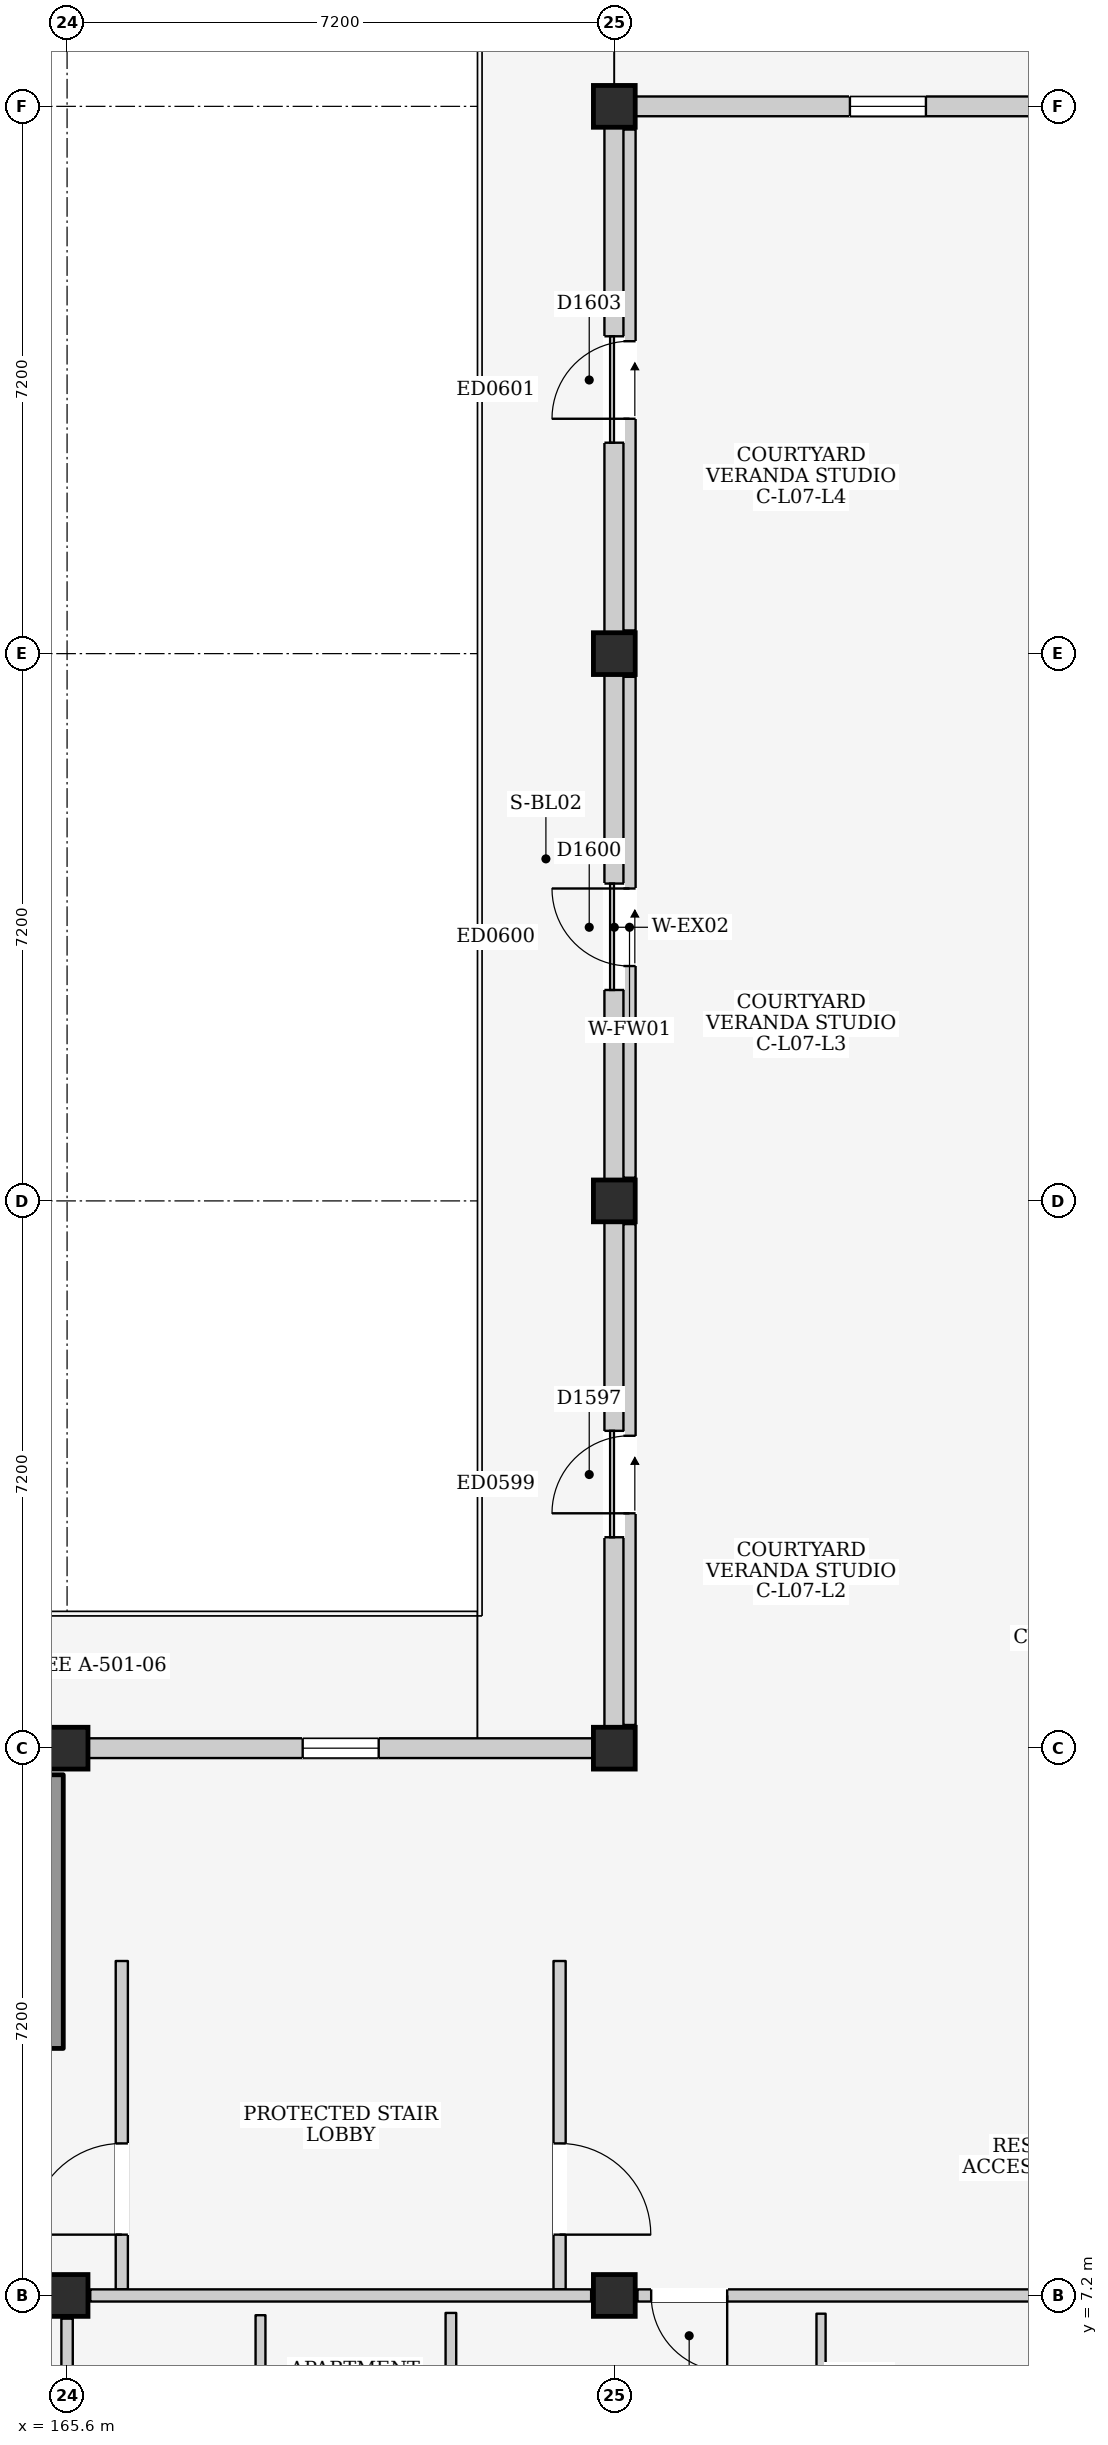
"""IFC4 building model, lengths in metres.
Left out: names, types, materials, properties, quantities, classifications, styles, units other than length and angle.
Written with IfcOpenShell. Run it as: python <this file> out.ifc"""

import sys

from ifc_helpers import new_model, si_unit, direction, frame, frame_2d, origin, origin_2d, place, context, subcontext, project, spatial, rectangle, extrude, element, fill, save


model = new_model("IFC4")
c1 = context("Model", 3, precision=1e-05, world=origin(), true_north=direction((0.0, 1.0)))
c2 = subcontext(c1, "Body", "Model", "MODEL_VIEW")
j1 = project(units=[si_unit("LENGTHUNIT", "METRE"), si_unit("PLANEANGLEUNIT", "RADIAN")], contexts=[c1])
p1 = place(None, origin())
s1 = spatial("IfcSite", under=j1, at=p1, CompositionType="ELEMENT")
p2 = place(p1, origin())
s2 = spatial("IfcBuilding", under=s1, at=p2, CompositionType="ELEMENT")
p3 = place(p2, frame((0.0, 0.0, 25.1)))
s3 = spatial("IfcBuildingStorey", under=s2, at=p3, CompositionType="ELEMENT", Elevation=25.1)
for number, where, z_axis, x_axis in (
    (1, (165.6, 7.2, 0.0), (0.0, 0.0, 1.0), (1.0, 0.0, 0.0)),
    (2, (165.6, 14.4, 0.0), (0.0, 0.0, 1.0), (1.0, 0.0, 0.0)),
    (3, (172.8, 7.2, 0.0), (0.0, 0.0, 1.0), (1.0, 0.0, 0.0)),
    (4, (172.8, 14.4, 0.0), (0.0, 0.0, 1.0), (1.0, 0.0, 0.0)),
    (5, (172.8, 21.6, 0.0), (0.0, 0.0, 1.0), (1.0, 0.0, 0.0)),
    (6, (172.8, 28.8, 0.0), (0.0, 0.0, 1.0), (1.0, 0.0, 0.0)),
    (7, (172.8, 36.0, 0.0), (0.0, 0.0, 1.0), (1.0, 0.0, 0.0)),
):
    element("IfcColumn", number, at=place(p3, frame(where, z_axis=z_axis, x_axis=x_axis)), inside=s3, PredefinedType="COLUMN", context=c2, shape_type="SweptSolid", body=[
        extrude(rectangle(XDim=0.55, YDim=0.55, at=origin_2d()), origin(), (0.0, 0.0, 1.0), 3.2),
    ])
p4 = place(p3, frame((165.875, 14.4, 0.0), z_axis=(0.0, 0.0, 1.0), x_axis=(1.0, 0.0, 0.0)))
e8 = element("IfcWall", 8, at=p4, inside=s3, PredefinedType="ELEMENTEDWALL", context=c2, shape_type="SweptSolid", body=[
    extrude(rectangle(XDim=6.65, YDim=0.26, at=frame_2d((3.325, 0.0))), origin(), (0.0, 0.0, 1.0), 2.375),
])
p5 = place(p4, frame((2.825, 0.0, 1.2)))
e9 = element("IfcOpeningElement", 9, at=p5, cuts=e8, PredefinedType="OPENING", context=c2, shape_type="SweptSolid", body=[
    extrude(rectangle(XDim=1.0, YDim=0.9, at=frame_2d((0.5, 0.45))), frame((0.0, 0.145, 0.0), z_axis=(0.0, -1.0, 0.0), x_axis=(1.0, 0.0, 0.0)), (0.0, 0.0, 1.0), 0.29),
])
p6 = place(p3, frame((172.8, 14.675, 0.0), z_axis=(0.0, 0.0, 1.0), x_axis=(0.0, 1.0, 0.0)))
e10 = element("IfcWall", 10, at=p6, inside=s3, PredefinedType="ELEMENTEDWALL", context=c2, shape_type="SweptSolid", body=[
    extrude(rectangle(XDim=6.65, YDim=0.26, at=frame_2d((3.325, 0.0))), origin(), (0.0, 0.0, 1.0), 2.475),
])
p7 = place(p6, frame((2.5, 0.0, 0.0)))
e11 = element("IfcOpeningElement", 11, at=p7, cuts=e10, PredefinedType="OPENING", context=c2, shape_type="SweptSolid", body=[
    extrude(rectangle(XDim=1.4, YDim=2.1, at=frame_2d((0.7, 1.05))), frame((0.0, 0.145, 0.0), z_axis=(0.0, -1.0, 0.0), x_axis=(1.0, 0.0, 0.0)), (0.0, 0.0, 1.0), 0.29),
])
p8 = place(p3, frame((172.8, 21.875, 0.0), z_axis=(0.0, 0.0, 1.0), x_axis=(0.0, 1.0, 0.0)))
e12 = element("IfcWall", 12, at=p8, inside=s3, PredefinedType="ELEMENTEDWALL", context=c2, shape_type="SweptSolid", body=[
    extrude(rectangle(XDim=6.65, YDim=0.26, at=frame_2d((3.325, 0.0))), origin(), (0.0, 0.0, 1.0), 2.475),
])
p9 = place(p8, frame((2.5, 0.0, 0.0)))
e13 = element("IfcOpeningElement", 13, at=p9, cuts=e12, PredefinedType="OPENING", context=c2, shape_type="SweptSolid", body=[
    extrude(rectangle(XDim=1.4, YDim=2.1, at=frame_2d((0.7, 1.05))), frame((0.0, 0.145, 0.0), z_axis=(0.0, -1.0, 0.0), x_axis=(1.0, 0.0, 0.0)), (0.0, 0.0, 1.0), 0.29),
])
p10 = place(p3, frame((173.075, 36.0, 0.0), z_axis=(0.0, 0.0, 1.0), x_axis=(1.0, 0.0, 0.0)))
e14 = element("IfcWall", 14, at=p10, inside=s3, PredefinedType="ELEMENTEDWALL", context=c2, shape_type="SweptSolid", body=[
    extrude(rectangle(XDim=6.65, YDim=0.26, at=frame_2d((3.325, 0.0))), origin(), (0.0, 0.0, 1.0), 2.375),
])
p11 = place(p10, frame((2.825, 0.0, 1.1)))
e15 = element("IfcOpeningElement", 15, at=p11, cuts=e14, PredefinedType="OPENING", context=c2, shape_type="SweptSolid", body=[
    extrude(rectangle(XDim=1.0, YDim=0.9, at=frame_2d((0.5, 0.45))), frame((0.0, 0.145, 0.0), z_axis=(0.0, -1.0, 0.0), x_axis=(1.0, 0.0, 0.0)), (0.0, 0.0, 1.0), 0.29),
])
p12 = place(p3, frame((172.8, 29.075, 0.0), z_axis=(0.0, 0.0, 1.0), x_axis=(0.0, 1.0, 0.0)))
e16 = element("IfcWall", 16, at=p12, inside=s3, PredefinedType="ELEMENTEDWALL", context=c2, shape_type="SweptSolid", body=[
    extrude(rectangle(XDim=6.65, YDim=0.26, at=frame_2d((3.325, 0.0))), origin(), (0.0, 0.0, 1.0), 2.475),
])
p13 = place(p12, frame((2.5, 0.0, 0.0)))
e17 = element("IfcOpeningElement", 17, at=p13, cuts=e16, PredefinedType="OPENING", context=c2, shape_type="SweptSolid", body=[
    extrude(rectangle(XDim=1.4, YDim=2.1, at=frame_2d((0.7, 1.05))), frame((0.0, 0.145, 0.0), z_axis=(0.0, -1.0, 0.0), x_axis=(1.0, 0.0, 0.0)), (0.0, 0.0, 1.0), 0.29),
])
p14 = place(p3, frame((165.4, 10.45, 0.0), z_axis=(0.0, 0.0, 1.0), x_axis=(0.0, 1.0, 0.0)))
e18 = element("IfcWall", 18, at=p14, inside=s3, PredefinedType="SHEAR", context=c2, shape_type="SweptSolid", body=[
    extrude(rectangle(XDim=3.6, YDim=0.3, at=frame_2d((1.8, 0.0))), origin(), (0.0, 0.0, 1.0), 2.99),
])
p15 = place(p3, frame((166.32, 7.28, 0.0), z_axis=(0.0, 0.0, 1.0), x_axis=(0.0, 1.0, 0.0)))
e19 = element("IfcWall", 19, at=p15, inside=s3, PredefinedType="PARTITIONING", context=c2, shape_type="SweptSolid", body=[
    extrude(rectangle(XDim=4.32, YDim=0.16, at=frame_2d((2.16, 0.0))), origin(), (0.0, 0.0, 1.0), 2.99),
])
p16 = place(p15, frame((0.72, 0.0, 0.0)))
e20 = element("IfcOpeningElement", 20, at=p16, cuts=e19, PredefinedType="OPENING", context=c2, shape_type="SweptSolid", body=[
    extrude(rectangle(XDim=1.2, YDim=2.2, at=frame_2d((0.6, 1.1))), frame((0.0, 0.095, 0.0), z_axis=(0.0, -1.0, 0.0), x_axis=(1.0, 0.0, 0.0)), (0.0, 0.0, 1.0), 0.19),
])
p17 = place(p3, frame((172.08, 7.28, 0.0), z_axis=(0.0, 0.0, 1.0), x_axis=(0.0, 1.0, 0.0)))
e21 = element("IfcWall", 21, at=p17, inside=s3, PredefinedType="PARTITIONING", context=c2, shape_type="SweptSolid", body=[
    extrude(rectangle(XDim=4.32, YDim=0.16, at=frame_2d((2.16, 0.0))), origin(), (0.0, 0.0, 1.0), 2.99),
])
p18 = place(p17, frame((0.72, 0.0, 0.0)))
e22 = element("IfcOpeningElement", 22, at=p18, cuts=e21, PredefinedType="OPENING", context=c2, shape_type="SweptSolid", body=[
    extrude(rectangle(XDim=1.2, YDim=2.2, at=frame_2d((0.6, 1.1))), frame((0.0, 0.095, 0.0), z_axis=(0.0, -1.0, 0.0), x_axis=(1.0, 0.0, 0.0)), (0.0, 0.0, 1.0), 0.19),
])
p19 = place(p3, frame((165.6, 0.305, 0.0), z_axis=(0.0, 0.0, 1.0), x_axis=(0.0, 1.0, 0.0)))
e23 = element("IfcWall", 23, at=p19, inside=s3, PredefinedType="PARTITIONING", context=c2, shape_type="SweptSolid", body=[
    extrude(rectangle(XDim=6.59, YDim=0.15, at=frame_2d((3.295, 0.0))), origin(), (0.0, 0.0, 1.0), 2.475),
])
p20 = place(p3, frame((165.905, 7.2, 0.0), z_axis=(0.0, 0.0, 1.0), x_axis=(1.0, 0.0, 0.0)))
e24 = element("IfcWall", 24, at=p20, inside=s3, PredefinedType="PARTITIONING", context=c2, shape_type="SweptSolid", body=[
    extrude(rectangle(XDim=6.59, YDim=0.16, at=frame_2d((3.295, 0.0))), origin(), (0.0, 0.0, 1.0), 2.375),
])
p21 = place(p3, frame((173.105, 7.2, 0.0), z_axis=(0.0, 0.0, 1.0), x_axis=(1.0, 0.0, 0.0)))
e25 = element("IfcWall", 25, at=p21, inside=s3, PredefinedType="PARTITIONING", context=c2, shape_type="SweptSolid", body=[
    extrude(rectangle(XDim=6.59, YDim=0.16, at=frame_2d((3.295, 0.0))), origin(), (0.0, 0.0, 1.0), 2.375),
])
p22 = place(p21, frame((0.18, 0.0, 0.0)))
e26 = element("IfcOpeningElement", 26, at=p22, cuts=e25, PredefinedType="OPENING", context=c2, shape_type="SweptSolid", body=[
    extrude(rectangle(XDim=1.0, YDim=2.15, at=frame_2d((0.5, 1.075))), frame((0.0, 0.095, 0.0), z_axis=(0.0, -1.0, 0.0), x_axis=(1.0, 0.0, 0.0)), (0.0, 0.0, 1.0), 0.19),
])
p23 = place(p3, frame((168.145, 3.9, 0.0), z_axis=(0.0, 0.0, 1.0), x_axis=(0.0, 1.0, 0.0)))
e27 = element("IfcWall", 27, at=p23, inside=s3, PredefinedType="PARTITIONING", context=c2, shape_type="SweptSolid", body=[
    extrude(rectangle(XDim=3.04, YDim=0.13, at=frame_2d((1.52, 0.0))), origin(), (0.0, 0.0, 1.0), 2.99),
])
p24 = place(p3, frame((170.65, 3.91, 0.0), z_axis=(0.0, 0.0, 1.0), x_axis=(0.0, 1.0, 0.0)))
e28 = element("IfcWall", 28, at=p24, inside=s3, PredefinedType="PARTITIONING", context=c2, shape_type="SweptSolid", body=[
    extrude(rectangle(XDim=3.06, YDim=0.14, at=frame_2d((1.53, 0.0))), origin(), (0.0, 0.0, 1.0), 2.99),
])
p25 = place(p3, frame((175.52, 3.92, 0.0), z_axis=(0.0, 0.0, 1.0), x_axis=(0.0, 1.0, 0.0)))
e29 = element("IfcWall", 29, at=p25, inside=s3, PredefinedType="PARTITIONING", context=c2, shape_type="SweptSolid", body=[
    extrude(rectangle(XDim=3.04, YDim=0.12, at=frame_2d((1.52, 0.0))), origin(), (0.0, 0.0, 1.0), 2.99),
])
p26 = place(p25, frame((1.04, 0.0, 0.0)))
e30 = element("IfcOpeningElement", 30, at=p26, cuts=e29, PredefinedType="OPENING", context=c2, shape_type="SweptSolid", body=[
    extrude(rectangle(XDim=0.96, YDim=2.15, at=frame_2d((0.48, 1.075))), frame((0.0, 0.075, 0.0), z_axis=(0.0, -1.0, 0.0), x_axis=(1.0, 0.0, 0.0)), (0.0, 0.0, 1.0), 0.15),
])
p27 = place(p3, frame((173.0, 14.705, 0.0), z_axis=(0.0, 0.0, 1.0), x_axis=(0.0, 1.0, 0.0)))
e31 = element("IfcWall", 31, at=p27, inside=s3, PredefinedType="PARTITIONING", context=c2, shape_type="SweptSolid", body=[
    extrude(rectangle(XDim=6.59, YDim=0.16, at=frame_2d((3.295, 0.0))), origin(), (0.0, 0.0, 1.0), 2.99),
])
p28 = place(p27, frame((2.785, 0.0, 0.0)))
e32 = element("IfcOpeningElement", 32, at=p28, cuts=e31, PredefinedType="OPENING", context=c2, shape_type="SweptSolid", body=[
    extrude(rectangle(XDim=1.02, YDim=2.18, at=frame_2d((0.51, 1.09))), frame((0.0, 0.095, 0.0), z_axis=(0.0, -1.0, 0.0), x_axis=(1.0, 0.0, 0.0)), (0.0, 0.0, 1.0), 0.19),
])
p29 = place(p3, frame((173.0, 21.905, 0.0), z_axis=(0.0, 0.0, 1.0), x_axis=(0.0, 1.0, 0.0)))
e33 = element("IfcWall", 33, at=p29, inside=s3, PredefinedType="PARTITIONING", context=c2, shape_type="SweptSolid", body=[
    extrude(rectangle(XDim=6.59, YDim=0.16, at=frame_2d((3.295, 0.0))), origin(), (0.0, 0.0, 1.0), 2.99),
])
p30 = place(p29, frame((2.785, 0.0, 0.0)))
e34 = element("IfcOpeningElement", 34, at=p30, cuts=e33, PredefinedType="OPENING", context=c2, shape_type="SweptSolid", body=[
    extrude(rectangle(XDim=1.02, YDim=2.18, at=frame_2d((0.51, 1.09))), frame((0.0, 0.095, 0.0), z_axis=(0.0, -1.0, 0.0), x_axis=(1.0, 0.0, 0.0)), (0.0, 0.0, 1.0), 0.19),
])
p31 = place(p3, frame((173.0, 29.105, 0.0), z_axis=(0.0, 0.0, 1.0), x_axis=(0.0, 1.0, 0.0)))
e35 = element("IfcWall", 35, at=p31, inside=s3, PredefinedType="PARTITIONING", context=c2, shape_type="SweptSolid", body=[
    extrude(rectangle(XDim=6.59, YDim=0.16, at=frame_2d((3.295, 0.0))), origin(), (0.0, 0.0, 1.0), 2.99),
])
p32 = place(p31, frame((2.785, 0.0, 0.0)))
e36 = element("IfcOpeningElement", 36, at=p32, cuts=e35, PredefinedType="OPENING", context=c2, shape_type="SweptSolid", body=[
    extrude(rectangle(XDim=1.02, YDim=2.18, at=frame_2d((0.51, 1.09))), frame((0.0, 0.095, 0.0), z_axis=(0.0, -1.0, 0.0), x_axis=(1.0, 0.0, 0.0)), (0.0, 0.0, 1.0), 0.19),
])
p33 = place(p5, origin())
e37 = element("IfcWindow", 37, at=p33, inside=s3, PartitioningType="SINGLE_PANEL", PredefinedType="WINDOW", context=c2, shape_type="SweptSolid", body=[
    extrude(rectangle(XDim=1.0, YDim=0.9, at=frame_2d((0.5, 0.45))), frame((0.0, 0.03, 0.0), z_axis=(0.0, -1.0, 0.0), x_axis=(1.0, 0.0, 0.0)), (0.0, 0.0, 1.0), 0.06),
])
fill(e9, e37)
p34 = place(p7, frame((1.4, 0.0, 0.0), z_axis=(0.0, 0.0, 1.0), x_axis=(-1.0, 0.0, 0.0)))
e38 = element("IfcDoor", 38, at=p34, inside=s3, OperationType="SLIDING_TO_RIGHT", PredefinedType="DOOR", context=c2, shape_type="SweptSolid", body=[
    extrude(rectangle(XDim=1.4, YDim=2.1, at=frame_2d((0.7, 1.05))), frame((0.0, 0.025, 0.0), z_axis=(0.0, -1.0, 0.0), x_axis=(1.0, 0.0, 0.0)), (0.0, 0.0, 1.0), 0.05),
])
fill(e11, e38)
p35 = place(p9, frame((1.4, 0.0, 0.0), z_axis=(0.0, 0.0, 1.0), x_axis=(-1.0, 0.0, 0.0)))
e39 = element("IfcDoor", 39, at=p35, inside=s3, OperationType="SLIDING_TO_RIGHT", PredefinedType="DOOR", context=c2, shape_type="SweptSolid", body=[
    extrude(rectangle(XDim=1.4, YDim=2.1, at=frame_2d((0.7, 1.05))), frame((0.0, 0.025, 0.0), z_axis=(0.0, -1.0, 0.0), x_axis=(1.0, 0.0, 0.0)), (0.0, 0.0, 1.0), 0.05),
])
fill(e13, e39)
p36 = place(p11, origin())
e40 = element("IfcWindow", 40, at=p36, inside=s3, PartitioningType="SINGLE_PANEL", PredefinedType="WINDOW", context=c2, shape_type="SweptSolid", body=[
    extrude(rectangle(XDim=1.0, YDim=0.9, at=frame_2d((0.5, 0.45))), frame((0.0, 0.03, 0.0), z_axis=(0.0, -1.0, 0.0), x_axis=(1.0, 0.0, 0.0)), (0.0, 0.0, 1.0), 0.06),
])
fill(e15, e40)
p37 = place(p13, frame((1.4, 0.0, 0.0), z_axis=(0.0, 0.0, 1.0), x_axis=(-1.0, 0.0, 0.0)))
e41 = element("IfcDoor", 41, at=p37, inside=s3, OperationType="SLIDING_TO_RIGHT", PredefinedType="DOOR", context=c2, shape_type="SweptSolid", body=[
    extrude(rectangle(XDim=1.4, YDim=2.1, at=frame_2d((0.7, 1.05))), frame((0.0, 0.025, 0.0), z_axis=(0.0, -1.0, 0.0), x_axis=(1.0, 0.0, 0.0)), (0.0, 0.0, 1.0), 0.05),
])
fill(e17, e41)
p38 = place(p16, origin())
e42 = element("IfcDoor", 42, at=p38, inside=s3, OperationType="SINGLE_SWING_LEFT", PredefinedType="DOOR", context=c2, shape_type="SweptSolid", body=[
    extrude(rectangle(XDim=1.2, YDim=2.2, at=frame_2d((0.6, 1.1))), frame((0.0, 0.025, 0.0), z_axis=(0.0, -1.0, 0.0), x_axis=(1.0, 0.0, 0.0)), (0.0, 0.0, 1.0), 0.05),
])
fill(e20, e42)
p39 = place(p18, frame((1.2, 0.0, 0.0), z_axis=(0.0, 0.0, 1.0), x_axis=(-1.0, 0.0, 0.0)))
e43 = element("IfcDoor", 43, at=p39, inside=s3, OperationType="SINGLE_SWING_RIGHT", PredefinedType="DOOR", context=c2, shape_type="SweptSolid", body=[
    extrude(rectangle(XDim=1.2, YDim=2.2, at=frame_2d((0.6, 1.1))), frame((0.0, 0.025, 0.0), z_axis=(0.0, -1.0, 0.0), x_axis=(1.0, 0.0, 0.0)), (0.0, 0.0, 1.0), 0.05),
])
fill(e22, e43)
p40 = place(p22, frame((1.0, 0.0, 0.0), z_axis=(0.0, 0.0, 1.0), x_axis=(-1.0, 0.0, 0.0)))
e44 = element("IfcDoor", 44, at=p40, inside=s3, OperationType="SINGLE_SWING_LEFT", PredefinedType="DOOR", context=c2, shape_type="SweptSolid", body=[
    extrude(rectangle(XDim=1.0, YDim=2.15, at=frame_2d((0.5, 1.075))), frame((0.0, 0.025, 0.0), z_axis=(0.0, -1.0, 0.0), x_axis=(1.0, 0.0, 0.0)), (0.0, 0.0, 1.0), 0.05),
])
fill(e26, e44)
p41 = place(p28, origin())
e45 = element("IfcDoor", 45, at=p41, inside=s3, OperationType="SINGLE_SWING_LEFT", PredefinedType="DOOR", context=c2, shape_type="SweptSolid", body=[
    extrude(rectangle(XDim=1.02, YDim=2.18, at=frame_2d((0.51, 1.09))), frame((0.0, 0.025, 0.0), z_axis=(0.0, -1.0, 0.0), x_axis=(1.0, 0.0, 0.0)), (0.0, 0.0, 1.0), 0.05),
])
fill(e32, e45)
p42 = place(p30, origin())
e46 = element("IfcDoor", 46, at=p42, inside=s3, OperationType="SINGLE_SWING_RIGHT", PredefinedType="DOOR", context=c2, shape_type="SweptSolid", body=[
    extrude(rectangle(XDim=1.02, YDim=2.18, at=frame_2d((0.51, 1.09))), frame((0.0, 0.025, 0.0), z_axis=(0.0, -1.0, 0.0), x_axis=(1.0, 0.0, 0.0)), (0.0, 0.0, 1.0), 0.05),
])
fill(e34, e46)
p43 = place(p32, origin())
e47 = element("IfcDoor", 47, at=p43, inside=s3, OperationType="SINGLE_SWING_LEFT", PredefinedType="DOOR", context=c2, shape_type="SweptSolid", body=[
    extrude(rectangle(XDim=1.02, YDim=2.18, at=frame_2d((0.51, 1.09))), frame((0.0, 0.025, 0.0), z_axis=(0.0, -1.0, 0.0), x_axis=(1.0, 0.0, 0.0)), (0.0, 0.0, 1.0), 0.05),
])
fill(e36, e47)
save(model, sys.argv[1])
